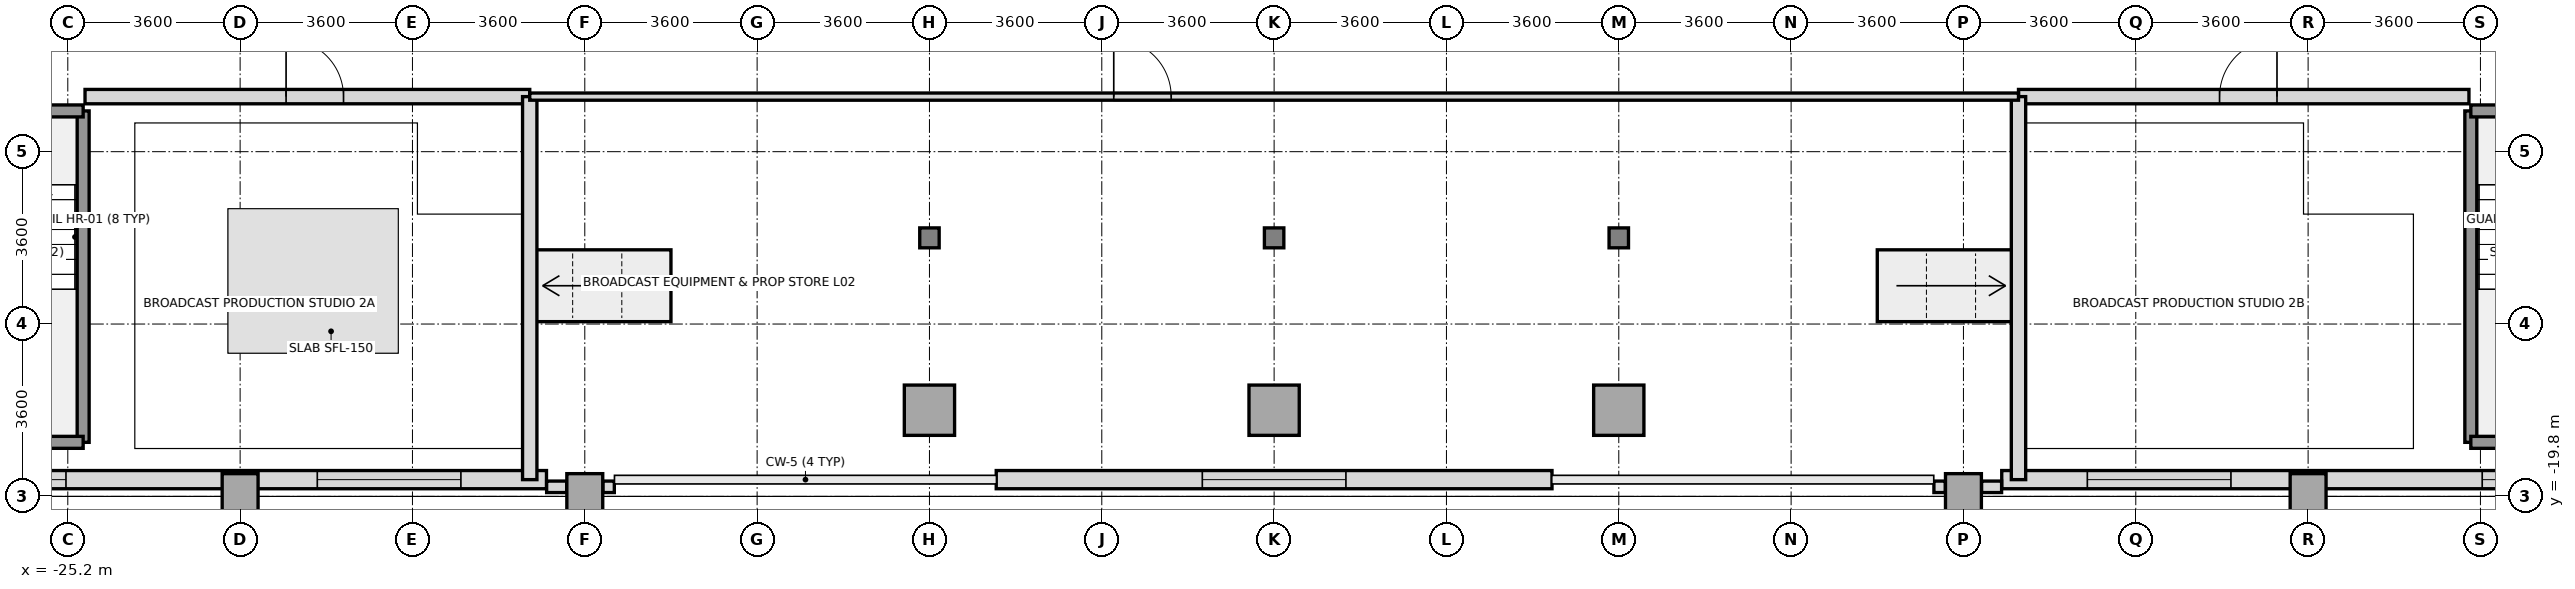
"""IFC4 building model, lengths in metres.
Left out: names, types, materials, properties, quantities, classifications, styles, units other than length and angle.
Written with IfcOpenShell. Run it as: python <this file> out.ifc"""

import sys

from ifc_helpers import new_model, si_unit, direction, frame, frame_2d, origin, origin_2d, place, context, subcontext, project, spatial, rectangle, i_section, extrude, source, transform, mapped, element, fill, save


model = new_model("IFC4")
c1 = context("Model", 3, precision=1e-05, world=origin(), true_north=direction((0.0, 1.0)))
c2 = subcontext(c1, "Body", "Model", "MODEL_VIEW")
j1 = project(units=[si_unit("LENGTHUNIT", "METRE"), si_unit("PLANEANGLEUNIT", "RADIAN")], contexts=[c1])
p1 = place(None, origin())
s1 = spatial("IfcSite", under=j1, at=p1, CompositionType="ELEMENT")
p2 = place(p1, origin())
s2 = spatial("IfcBuilding", under=s1, at=p2, CompositionType="ELEMENT")
p3 = place(p2, frame((0.0, 0.0, 10.2)))
s3 = spatial("IfcBuildingStorey", under=s2, at=p3, CompositionType="ELEMENT", Elevation=10.2)
m1 = source(origin(), c2, "Body", "SweptSolid", [
    extrude(rectangle(XDim=0.75, YDim=0.95, at=origin_2d()), origin(), (0.0, 0.0, 1.0), 5.15),
])
for number, where, z_axis, x_axis in (
    (1, (-21.6, -19.8, 0.0), (0.0, 0.0, 1.0), (1.0, 0.0, 0.0)),
    (2, (-14.4, -19.8, 0.0), (0.0, 0.0, 1.0), (1.0, 0.0, 0.0)),
):
    element("IfcColumn", number, at=place(p3, frame(where, z_axis=z_axis, x_axis=x_axis)), inside=s3, PredefinedType="COLUMN", context=c2, shape_type="MappedRepresentation", body=[
        mapped(m1, transform((0.0, 0.0, 0.0), x_axis=(1.0, 0.0, 0.0), y_axis=(0.0, 1.0, 0.0), z_axis=(0.0, 0.0, 1.0), scale=1.0)),
    ])
m2 = source(origin(), c2, "Body", "SweptSolid", [
    extrude(rectangle(XDim=1.05, YDim=1.05, at=origin_2d()), origin(), (0.0, 0.0, 1.0), 5.15),
])
p4 = place(p3, frame((-7.2, -18.0, 0.0), z_axis=(0.0, 0.0, 1.0), x_axis=(1.0, 0.0, 0.0)))
e3 = element("IfcColumn", 3, at=p4, inside=s3, PredefinedType="COLUMN", context=c2, shape_type="MappedRepresentation", body=[
    mapped(m2, transform((0.0, 0.0, 0.0), x_axis=(1.0, 0.0, 0.0), y_axis=(0.0, 1.0, 0.0), z_axis=(0.0, 0.0, 1.0), scale=1.0)),
])
m3 = source(origin(), c2, "Body", "SweptSolid", [
    extrude(i_section(OverallWidth=0.406, OverallDepth=0.416, WebThickness=0.024, FlangeThickness=0.039, at=origin_2d()), origin(), (0.0, 0.0, 1.0), 5.15),
])
p5 = place(p3, frame((-7.2, -14.4, 0.0), z_axis=(0.0, 0.0, 1.0), x_axis=(1.0, 0.0, 0.0)))
e4 = element("IfcColumn", 4, at=p5, inside=s3, PredefinedType="COLUMN", context=c2, shape_type="MappedRepresentation", body=[
    mapped(m3, transform((0.0, 0.0, 0.0), x_axis=(1.0, 0.0, 0.0), y_axis=(0.0, 1.0, 0.0), z_axis=(0.0, 0.0, 1.0), scale=1.0)),
])
p6 = place(p3, frame((0.0, -18.0, 0.0), z_axis=(0.0, 0.0, 1.0), x_axis=(1.0, 0.0, 0.0)))
e5 = element("IfcColumn", 5, at=p6, inside=s3, PredefinedType="COLUMN", context=c2, shape_type="MappedRepresentation", body=[
    mapped(m2, transform((0.0, 0.0, 0.0), x_axis=(1.0, 0.0, 0.0), y_axis=(0.0, 1.0, 0.0), z_axis=(0.0, 0.0, 1.0), scale=1.0)),
])
p7 = place(p3, frame((0.0, -14.4, 0.0), z_axis=(0.0, 0.0, 1.0), x_axis=(1.0, 0.0, 0.0)))
e6 = element("IfcColumn", 6, at=p7, inside=s3, PredefinedType="COLUMN", context=c2, shape_type="MappedRepresentation", body=[
    mapped(m3, transform((0.0, 0.0, 0.0), x_axis=(1.0, 0.0, 0.0), y_axis=(0.0, 1.0, 0.0), z_axis=(0.0, 0.0, 1.0), scale=1.0)),
])
p8 = place(p3, frame((7.2, -18.0, 0.0), z_axis=(0.0, 0.0, 1.0), x_axis=(1.0, 0.0, 0.0)))
e7 = element("IfcColumn", 7, at=p8, inside=s3, PredefinedType="COLUMN", context=c2, shape_type="MappedRepresentation", body=[
    mapped(m2, transform((0.0, 0.0, 0.0), x_axis=(1.0, 0.0, 0.0), y_axis=(0.0, 1.0, 0.0), z_axis=(0.0, 0.0, 1.0), scale=1.0)),
])
p9 = place(p3, frame((7.2, -14.4, 0.0), z_axis=(0.0, 0.0, 1.0), x_axis=(1.0, 0.0, 0.0)))
e8 = element("IfcColumn", 8, at=p9, inside=s3, PredefinedType="COLUMN", context=c2, shape_type="MappedRepresentation", body=[
    mapped(m3, transform((0.0, 0.0, 0.0), x_axis=(1.0, 0.0, 0.0), y_axis=(0.0, 1.0, 0.0), z_axis=(0.0, 0.0, 1.0), scale=1.0)),
])
for number, where, z_axis, x_axis in (
    (9, (14.4, -19.8, 0.0), (0.0, 0.0, 1.0), (1.0, 0.0, 0.0)),
    (10, (21.6, -19.8, 0.0), (0.0, 0.0, 1.0), (1.0, 0.0, 0.0)),
):
    element("IfcColumn", number, at=place(p3, frame(where, z_axis=z_axis, x_axis=x_axis)), inside=s3, PredefinedType="COLUMN", context=c2, shape_type="MappedRepresentation", body=[
        mapped(m1, transform((0.0, 0.0, 0.0), x_axis=(1.0, 0.0, 0.0), y_axis=(0.0, 1.0, 0.0), z_axis=(0.0, 0.0, 1.0), scale=1.0)),
    ])
p10 = place(p3, frame((-32.05, -19.45, 0.0), z_axis=(0.0, 0.0, 1.0), x_axis=(1.0, 0.0, 0.0)))
e11 = element("IfcWall", 11, at=p10, inside=s3, PredefinedType="SOLIDWALL", context=c2, shape_type="SweptSolid", body=[
    extrude(rectangle(XDim=16.85, YDim=0.38, at=frame_2d((8.425, 0.0))), origin(), (0.0, 0.0, 1.0), 4.4),
])
p11 = place(p10, frame((3.812, 0.0, 0.95)))
e12 = element("IfcOpeningElement", 12, at=p11, cuts=e11, PredefinedType="OPENING", context=c2, shape_type="SweptSolid", body=[
    extrude(rectangle(XDim=3.0, YDim=2.4, at=frame_2d((1.5, 1.2))), frame((0.0, 0.2, 0.0), z_axis=(0.0, -1.0, 0.0), x_axis=(1.0, 0.0, 0.0)), (0.0, 0.0, 1.0), 0.4),
])
p12 = place(p10, frame((12.062, 0.0, 0.95)))
e13 = element("IfcOpeningElement", 13, at=p12, cuts=e11, PredefinedType="OPENING", context=c2, shape_type="SweptSolid", body=[
    extrude(rectangle(XDim=3.0, YDim=2.4, at=frame_2d((1.5, 1.2))), frame((0.0, 0.2, 0.0), z_axis=(0.0, -1.0, 0.0), x_axis=(1.0, 0.0, 0.0)), (0.0, 0.0, 1.0), 0.4),
])
p13 = place(p3, frame((15.2, -19.45, 0.0), z_axis=(0.0, 0.0, 1.0), x_axis=(1.0, 0.0, 0.0)))
e14 = element("IfcWall", 14, at=p13, inside=s3, PredefinedType="SOLIDWALL", context=c2, shape_type="SweptSolid", body=[
    extrude(rectangle(XDim=16.85, YDim=0.38, at=frame_2d((8.425, 0.0))), origin(), (0.0, 0.0, 1.0), 4.4),
])
p14 = place(p13, frame((1.788, 0.0, 0.95)))
e15 = element("IfcOpeningElement", 15, at=p14, cuts=e14, PredefinedType="OPENING", context=c2, shape_type="SweptSolid", body=[
    extrude(rectangle(XDim=3.0, YDim=2.4, at=frame_2d((1.5, 1.2))), frame((0.0, 0.2, 0.0), z_axis=(0.0, -1.0, 0.0), x_axis=(1.0, 0.0, 0.0)), (0.0, 0.0, 1.0), 0.4),
])
p15 = place(p13, frame((10.037, 0.0, 0.95)))
e16 = element("IfcOpeningElement", 16, at=p15, cuts=e14, PredefinedType="OPENING", context=c2, shape_type="SweptSolid", body=[
    extrude(rectangle(XDim=3.0, YDim=2.4, at=frame_2d((1.5, 1.2))), frame((0.0, 0.2, 0.0), z_axis=(0.0, -1.0, 0.0), x_axis=(1.0, 0.0, 0.0)), (0.0, 0.0, 1.0), 0.4),
])
p16 = place(p3, frame((-5.805, -19.45, 0.0), z_axis=(0.0, 0.0, 1.0), x_axis=(1.0, 0.0, 0.0)))
e17 = element("IfcWall", 17, at=p16, inside=s3, PredefinedType="SOLIDWALL", context=c2, shape_type="SweptSolid", body=[
    extrude(rectangle(XDim=11.61, YDim=0.38, at=frame_2d((5.805, 0.0))), origin(), (0.0, 0.0, 1.0), 4.55),
])
p17 = place(p16, frame((4.305, 0.0, 0.95)))
e18 = element("IfcOpeningElement", 18, at=p17, cuts=e17, PredefinedType="OPENING", context=c2, shape_type="SweptSolid", body=[
    extrude(rectangle(XDim=3.0, YDim=2.4, at=frame_2d((1.5, 1.2))), frame((0.0, 0.2, 0.0), z_axis=(0.0, -1.0, 0.0), x_axis=(1.0, 0.0, 0.0)), (0.0, 0.0, 1.0), 0.4),
])
p18 = place(p3, frame((15.197, -19.6, 0.0), z_axis=(0.0, 0.0, 1.0), x_axis=(-1.0, 0.0, 0.0)))
e19 = element("IfcWall", 19, at=p18, inside=s3, PredefinedType="PARAPET", context=c2, shape_type="SweptSolid", body=[
    extrude(rectangle(XDim=0.419, YDim=0.24, at=frame_2d((0.209, 0.0))), origin(), (0.0, 0.0, 1.0), 1.15),
])
for number, where, z_axis, x_axis in (
    (20, (14.022, -19.6, 0.0), (0.0, 0.0, 1.0), (-1.0, 0.0, 0.0)),
    (21, (-13.783, -19.6, 0.0), (0.0, 0.0, 1.0), (-1.0, 0.0, 0.0)),
):
    element("IfcWall", number, at=place(p3, frame(where, z_axis=z_axis, x_axis=x_axis)), inside=s3, PredefinedType="PARAPET", context=c2, shape_type="SweptSolid", body=[
        extrude(rectangle(XDim=0.239, YDim=0.24, at=frame_2d((0.12, 0.0))), origin(), (0.0, 0.0, 1.0), 1.15),
    ])
p19 = place(p3, frame((-14.778, -19.6, 0.0), z_axis=(0.0, 0.0, 1.0), x_axis=(-1.0, 0.0, 0.0)))
e22 = element("IfcWall", 22, at=p19, inside=s3, PredefinedType="PARAPET", context=c2, shape_type="SweptSolid", body=[
    extrude(rectangle(XDim=0.419, YDim=0.24, at=frame_2d((0.209, 0.0))), origin(), (0.0, 0.0, 1.0), 1.15),
])
p20 = place(p3, frame((-24.879, -18.671, 0.0), z_axis=(0.0, 0.0, 1.0), x_axis=(0.0, 1.0, 0.0)))
e23 = element("IfcWall", 23, at=p20, inside=s3, PredefinedType="SOLIDWALL", context=c2, shape_type="SweptSolid", body=[
    extrude(rectangle(XDim=6.922, YDim=0.25, at=frame_2d((3.461, 0.0))), origin(), (0.0, 0.0, 1.0), 5.15),
])
p21 = place(p3, frame((-28.001, -18.671, 0.0), z_axis=(0.0, 0.0, 1.0), x_axis=(1.0, 0.0, 0.0)))
e24 = element("IfcWall", 24, at=p21, inside=s3, PredefinedType="SOLIDWALL", context=c2, shape_type="SweptSolid", body=[
    extrude(rectangle(XDim=3.122, YDim=0.25, at=frame_2d((1.561, 0.0))), origin(), (0.0, 0.0, 1.0), 5.15),
])
p22 = place(p3, frame((-28.001, -11.749, 0.0), z_axis=(0.0, 0.0, 1.0), x_axis=(1.0, 0.0, 0.0)))
e25 = element("IfcWall", 25, at=p22, inside=s3, PredefinedType="SOLIDWALL", context=c2, shape_type="SweptSolid", body=[
    extrude(rectangle(XDim=3.122, YDim=0.25, at=frame_2d((1.561, 0.0))), origin(), (0.0, 0.0, 1.0), 5.15),
])
p23 = place(p22, frame((0.8, 0.0, 0.0)))
e26 = element("IfcOpeningElement", 26, at=p23, cuts=e25, PredefinedType="OPENING", context=c2, shape_type="SweptSolid", body=[
    extrude(rectangle(XDim=1.2, YDim=2.2, at=frame_2d((0.6, 1.1))), frame((0.0, 0.135, 0.0), z_axis=(0.0, -1.0, 0.0), x_axis=(1.0, 0.0, 0.0)), (0.0, 0.0, 1.0), 0.27),
])
p24 = place(p3, frame((24.999, -18.671, 0.0), z_axis=(0.0, 0.0, 1.0), x_axis=(0.0, 1.0, 0.0)))
e27 = element("IfcWall", 27, at=p24, inside=s3, PredefinedType="SOLIDWALL", context=c2, shape_type="SweptSolid", body=[
    extrude(rectangle(XDim=6.922, YDim=0.25, at=frame_2d((3.461, 0.0))), origin(), (0.0, 0.0, 1.0), 5.15),
])
p25 = place(p3, frame((24.999, -18.671, 0.0), z_axis=(0.0, 0.0, 1.0), x_axis=(1.0, 0.0, 0.0)))
e28 = element("IfcWall", 28, at=p25, inside=s3, PredefinedType="SOLIDWALL", context=c2, shape_type="SweptSolid", body=[
    extrude(rectangle(XDim=3.122, YDim=0.25, at=frame_2d((1.561, 0.0))), origin(), (0.0, 0.0, 1.0), 5.15),
])
p26 = place(p3, frame((24.999, -11.749, 0.0), z_axis=(0.0, 0.0, 1.0), x_axis=(1.0, 0.0, 0.0)))
e29 = element("IfcWall", 29, at=p26, inside=s3, PredefinedType="SOLIDWALL", context=c2, shape_type="SweptSolid", body=[
    extrude(rectangle(XDim=3.122, YDim=0.25, at=frame_2d((1.561, 0.0))), origin(), (0.0, 0.0, 1.0), 5.15),
])
p27 = place(p26, frame((0.8, 0.0, 0.0)))
e30 = element("IfcOpeningElement", 30, at=p27, cuts=e29, PredefinedType="OPENING", context=c2, shape_type="SweptSolid", body=[
    extrude(rectangle(XDim=1.2, YDim=2.2, at=frame_2d((0.6, 1.1))), frame((0.0, 0.135, 0.0), z_axis=(0.0, -1.0, 0.0), x_axis=(1.0, 0.0, 0.0)), (0.0, 0.0, 1.0), 0.27),
])
p28 = place(p3, frame((-24.84, -11.45, 0.0), z_axis=(0.0, 0.0, 1.0), x_axis=(1.0, 0.0, 0.0)))
e31 = element("IfcWall", 31, at=p28, inside=s3, PredefinedType="SOLIDWALL", context=c2, shape_type="SweptSolid", body=[
    extrude(rectangle(XDim=9.29, YDim=0.3, at=frame_2d((4.645, 0.0))), origin(), (0.0, 0.0, 1.0), 5.15),
])
p29 = place(p28, frame((4.2, 0.0, 0.0)))
e32 = element("IfcOpeningElement", 32, at=p29, cuts=e31, PredefinedType="OPENING", context=c2, shape_type="SweptSolid", body=[
    extrude(rectangle(XDim=1.2, YDim=2.2, at=frame_2d((0.6, 1.1))), frame((0.0, 0.16, 0.0), z_axis=(0.0, -1.0, 0.0), x_axis=(1.0, 0.0, 0.0)), (0.0, 0.0, 1.0), 0.32),
])
p30 = place(p3, frame((-15.55, -19.45, 0.0), z_axis=(0.0, 0.0, 1.0), x_axis=(0.0, 1.0, 0.0)))
e33 = element("IfcWall", 33, at=p30, inside=s3, PredefinedType="SOLIDWALL", context=c2, shape_type="SweptSolid", body=[
    extrude(rectangle(XDim=8.0, YDim=0.3, at=frame_2d((4.0, 0.0))), origin(), (0.0, 0.0, 1.0), 4.4),
])
p31 = place(p3, frame((15.55, -11.45, 0.0), z_axis=(0.0, 0.0, 1.0), x_axis=(1.0, 0.0, 0.0)))
e34 = element("IfcWall", 34, at=p31, inside=s3, PredefinedType="SOLIDWALL", context=c2, shape_type="SweptSolid", body=[
    extrude(rectangle(XDim=9.41, YDim=0.3, at=frame_2d((4.705, 0.0))), origin(), (0.0, 0.0, 1.0), 5.15),
])
p32 = place(p31, frame((4.2, 0.0, 0.0)))
e35 = element("IfcOpeningElement", 35, at=p32, cuts=e34, PredefinedType="OPENING", context=c2, shape_type="SweptSolid", body=[
    extrude(rectangle(XDim=1.2, YDim=2.2, at=frame_2d((0.6, 1.1))), frame((0.0, 0.16, 0.0), z_axis=(0.0, -1.0, 0.0), x_axis=(1.0, 0.0, 0.0)), (0.0, 0.0, 1.0), 0.32),
])
p33 = place(p3, frame((15.55, -19.45, 0.0), z_axis=(0.0, 0.0, 1.0), x_axis=(0.0, 1.0, 0.0)))
e36 = element("IfcWall", 36, at=p33, inside=s3, PredefinedType="SOLIDWALL", context=c2, shape_type="SweptSolid", body=[
    extrude(rectangle(XDim=8.0, YDim=0.3, at=frame_2d((4.0, 0.0))), origin(), (0.0, 0.0, 1.0), 4.4),
])
p34 = place(p3, frame((-15.55, -11.45, 0.0), z_axis=(0.0, 0.0, 1.0), x_axis=(1.0, 0.0, 0.0)))
e37 = element("IfcWall", 37, at=p34, inside=s3, PredefinedType="PARTITIONING", context=c2, shape_type="SweptSolid", body=[
    extrude(rectangle(XDim=31.1, YDim=0.15, at=frame_2d((15.55, 0.0))), origin(), (0.0, 0.0, 1.0), 4.55),
])
p35 = place(p34, frame((12.2, 0.0, 0.0)))
e38 = element("IfcOpeningElement", 38, at=p35, cuts=e37, PredefinedType="OPENING", context=c2, shape_type="SweptSolid", body=[
    extrude(rectangle(XDim=1.2, YDim=2.2, at=frame_2d((0.6, 1.1))), frame((0.0, 0.085, 0.0), z_axis=(0.0, -1.0, 0.0), x_axis=(1.0, 0.0, 0.0)), (0.0, 0.0, 1.0), 0.17),
])
m4 = source(origin(), c2, "Body", "SweptSolid", [
    extrude(rectangle(XDim=3.0, YDim=2.4, at=frame_2d((1.5, 1.2))), frame((0.0, 0.03, 0.0), z_axis=(0.0, -1.0, 0.0), x_axis=(1.0, 0.0, 0.0)), (0.0, 0.0, 1.0), 0.06),
])
p36 = place(p11, origin())
e39 = element("IfcWindow", 39, at=p36, inside=s3, PartitioningType="SINGLE_PANEL", PredefinedType="WINDOW", context=c2, shape_type="MappedRepresentation", body=[
    mapped(m4, transform((0.0, 0.0, 0.0), x_axis=(1.0, 0.0, 0.0), y_axis=(0.0, 1.0, 0.0), z_axis=(0.0, 0.0, 1.0), scale=1.0)),
])
fill(e12, e39)
p37 = place(p12, origin())
e40 = element("IfcWindow", 40, at=p37, inside=s3, PartitioningType="SINGLE_PANEL", PredefinedType="WINDOW", context=c2, shape_type="MappedRepresentation", body=[
    mapped(m4, transform((0.0, 0.0, 0.0), x_axis=(1.0, 0.0, 0.0), y_axis=(0.0, 1.0, 0.0), z_axis=(0.0, 0.0, 1.0), scale=1.0)),
])
fill(e13, e40)
p38 = place(p14, origin())
e41 = element("IfcWindow", 41, at=p38, inside=s3, PartitioningType="SINGLE_PANEL", PredefinedType="WINDOW", context=c2, shape_type="MappedRepresentation", body=[
    mapped(m4, transform((0.0, 0.0, 0.0), x_axis=(1.0, 0.0, 0.0), y_axis=(0.0, 1.0, 0.0), z_axis=(0.0, 0.0, 1.0), scale=1.0)),
])
fill(e15, e41)
p39 = place(p15, origin())
e42 = element("IfcWindow", 42, at=p39, inside=s3, PartitioningType="SINGLE_PANEL", PredefinedType="WINDOW", context=c2, shape_type="MappedRepresentation", body=[
    mapped(m4, transform((0.0, 0.0, 0.0), x_axis=(1.0, 0.0, 0.0), y_axis=(0.0, 1.0, 0.0), z_axis=(0.0, 0.0, 1.0), scale=1.0)),
])
fill(e16, e42)
p40 = place(p17, origin())
e43 = element("IfcWindow", 43, at=p40, inside=s3, PartitioningType="SINGLE_PANEL", PredefinedType="WINDOW", context=c2, shape_type="MappedRepresentation", body=[
    mapped(m4, transform((0.0, 0.0, 0.0), x_axis=(1.0, 0.0, 0.0), y_axis=(0.0, 1.0, 0.0), z_axis=(0.0, 0.0, 1.0), scale=1.0)),
])
fill(e18, e43)
m5 = source(origin(), c2, "Body", "SweptSolid", [
    extrude(rectangle(XDim=1.2, YDim=2.2, at=frame_2d((0.6, 1.1))), frame((0.0, 0.025, 0.0), z_axis=(0.0, -1.0, 0.0), x_axis=(1.0, 0.0, 0.0)), (0.0, 0.0, 1.0), 0.05),
])
p41 = place(p29, origin())
e44 = element("IfcDoor", 44, at=p41, inside=s3, OperationType="SINGLE_SWING_LEFT", PredefinedType="DOOR", context=c2, shape_type="MappedRepresentation", body=[
    mapped(m5, transform((0.0, 0.0, 0.0), x_axis=(1.0, 0.0, 0.0), y_axis=(0.0, 1.0, 0.0), z_axis=(0.0, 0.0, 1.0), scale=1.0)),
])
fill(e32, e44)
p42 = place(p32, origin())
e45 = element("IfcDoor", 45, at=p42, inside=s3, OperationType="SINGLE_SWING_RIGHT", PredefinedType="DOOR", context=c2, shape_type="MappedRepresentation", body=[
    mapped(m5, transform((0.0, 0.0, 0.0), x_axis=(1.0, 0.0, 0.0), y_axis=(0.0, 1.0, 0.0), z_axis=(0.0, 0.0, 1.0), scale=1.0)),
])
fill(e35, e45)
p43 = place(p35, origin())
e46 = element("IfcDoor", 46, at=p43, inside=s3, OperationType="SINGLE_SWING_LEFT", PredefinedType="DOOR", context=c2, shape_type="MappedRepresentation", body=[
    mapped(m5, transform((0.0, 0.0, 0.0), x_axis=(1.0, 0.0, 0.0), y_axis=(0.0, 1.0, 0.0), z_axis=(0.0, 0.0, 1.0), scale=1.0)),
])
fill(e38, e46)
save(model, sys.argv[1])
